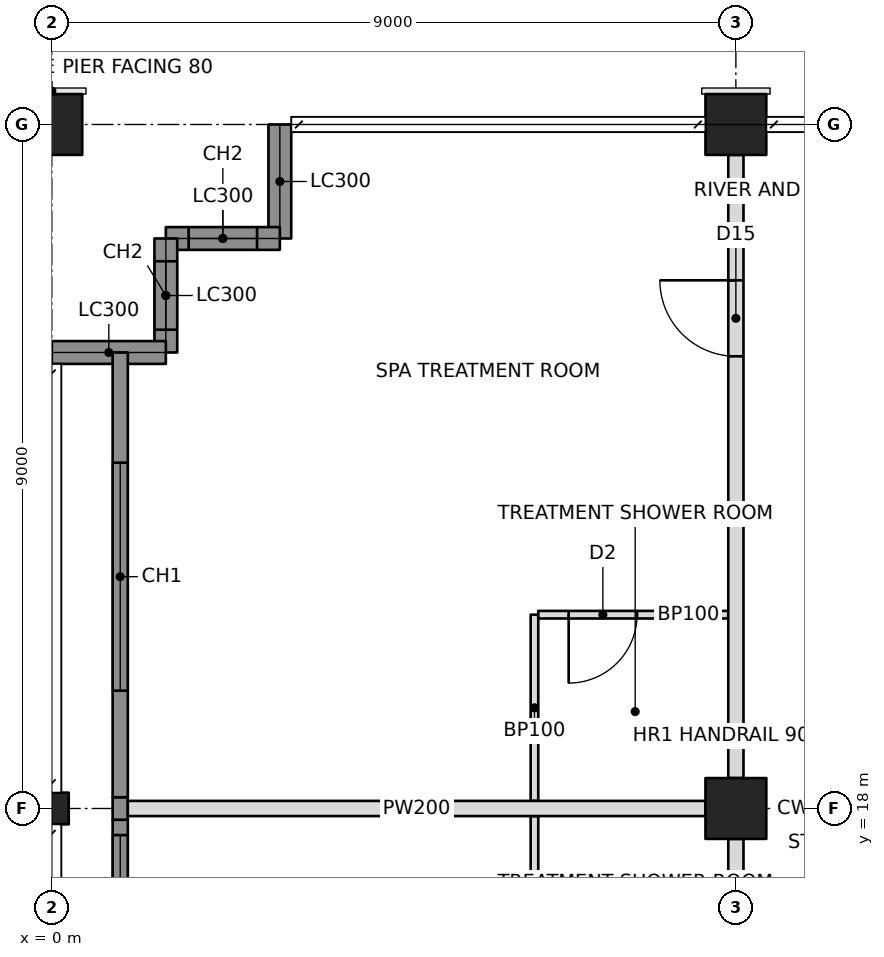
"""IFC4 building model, lengths in metres.
Left out: names, types, materials, properties, quantities, classifications, styles, units other than length and angle.
Written with IfcOpenShell. Run it as: python <this file> out.ifc"""

import sys

from ifc_helpers import new_model, si_unit, direction, frame, frame_2d, origin, origin_2d, place, context, subcontext, project, spatial, rectangle, hollow_rectangle, i_section, extrude, element, fill, save


model = new_model("IFC4")
c1 = context("Model", 3, precision=1e-05, world=origin(), true_north=direction((0.0, 1.0)))
c2 = subcontext(c1, "Body", "Model", "MODEL_VIEW")
j1 = project(units=[si_unit("LENGTHUNIT", "METRE"), si_unit("PLANEANGLEUNIT", "RADIAN")], contexts=[c1])
p1 = place(None, origin())
s1 = spatial("IfcSite", under=j1, at=p1, CompositionType="ELEMENT")
p2 = place(p1, origin())
s2 = spatial("IfcBuilding", under=s1, at=p2, CompositionType="ELEMENT")
p3 = place(p2, frame((0.0, 0.0, 266.2)))
s3 = spatial("IfcBuildingStorey", under=s2, at=p3, CompositionType="ELEMENT", Elevation=266.2)
p4 = place(p3, frame((0.0, 18.0, 0.0), z_axis=(0.0, 0.0, 1.0), x_axis=(0.0, 1.0, 0.0)))
e1 = element("IfcColumn", 1, at=p4, inside=s3, PredefinedType="COLUMN", context=c2, shape_type="SweptSolid", body=[
    extrude(i_section(OverallWidth=0.417, OverallDepth=0.445, WebThickness=0.039, FlangeThickness=0.063, at=origin_2d()), origin(), (0.0, 0.0, 1.0), 3.6),
])
for number, where, z_axis, x_axis in (
    (2, (0.0, 27.0, 0.0), (0.0, 0.0, 1.0), (0.0, 1.0, 0.0)),
    (3, (9.0, 18.0, 0.0), (0.0, 0.0, 1.0), (1.0, 0.0, 0.0)),
    (4, (9.0, 27.0, 0.0), (0.0, 0.0, 1.0), (1.0, 0.0, 0.0)),
):
    element("IfcColumn", number, at=place(p3, frame(where, z_axis=z_axis, x_axis=x_axis)), inside=s3, PredefinedType="COLUMN", context=c2, shape_type="SweptSolid", body=[
        extrude(hollow_rectangle(XDim=0.8, YDim=0.8, WallThickness=0.032, at=origin_2d()), origin(), (0.0, 0.0, 1.0), 3.6),
    ])
p5 = place(p3, frame((3.0, 27.0, 0.0), z_axis=(0.0, 0.0, 1.0), x_axis=(0.0, -1.0, 0.0)))
e5 = element("IfcWall", 5, at=p5, inside=s3, PredefinedType="SOLIDWALL", context=c2, shape_type="SweptSolid", body=[
    extrude(rectangle(XDim=1.5, YDim=0.3, at=frame_2d((0.75, 0.0))), origin(), (0.0, 0.0, 1.0), 2.57),
])
p6 = place(p3, frame((3.0, 25.5, 0.0), z_axis=(0.0, 0.0, 1.0), x_axis=(-1.0, 0.0, 0.0)))
e6 = element("IfcWall", 6, at=p6, inside=s3, PredefinedType="SOLIDWALL", context=c2, shape_type="SweptSolid", body=[
    extrude(rectangle(XDim=1.5, YDim=0.3, at=frame_2d((0.75, 0.0))), origin(), (0.0, 0.0, 1.0), 3.35),
])
p7 = place(p6, frame((0.3, 0.0, 0.6)))
e7 = element("IfcOpeningElement", 7, at=p7, cuts=e6, PredefinedType="OPENING", context=c2, shape_type="SweptSolid", body=[
    extrude(rectangle(XDim=0.9, YDim=2.2, at=frame_2d((0.45, 1.1))), frame((0.0, 0.16, 0.0), z_axis=(0.0, -1.0, 0.0), x_axis=(1.0, 0.0, 0.0)), (0.0, 0.0, 1.0), 0.32),
])
p8 = place(p3, frame((1.5, 25.5, 0.0), z_axis=(0.0, 0.0, 1.0), x_axis=(0.0, -1.0, 0.0)))
e8 = element("IfcWall", 8, at=p8, inside=s3, PredefinedType="SOLIDWALL", context=c2, shape_type="SweptSolid", body=[
    extrude(rectangle(XDim=1.5, YDim=0.3, at=frame_2d((0.75, 0.0))), origin(), (0.0, 0.0, 1.0), 3.35),
])
p9 = place(p8, frame((0.3, 0.0, 0.6)))
e9 = element("IfcOpeningElement", 9, at=p9, cuts=e8, PredefinedType="OPENING", context=c2, shape_type="SweptSolid", body=[
    extrude(rectangle(XDim=0.9, YDim=2.2, at=frame_2d((0.45, 1.1))), frame((0.0, 0.16, 0.0), z_axis=(0.0, -1.0, 0.0), x_axis=(1.0, 0.0, 0.0)), (0.0, 0.0, 1.0), 0.32),
])
p10 = place(p3, frame((1.5, 24.0, 0.0), z_axis=(0.0, 0.0, 1.0), x_axis=(-1.0, 0.0, 0.0)))
e10 = element("IfcWall", 10, at=p10, inside=s3, PredefinedType="SOLIDWALL", context=c2, shape_type="SweptSolid", body=[
    extrude(rectangle(XDim=1.5, YDim=0.3, at=frame_2d((0.75, 0.0))), origin(), (0.0, 0.0, 1.0), 2.57),
])
p11 = place(p3, frame((9.0, 10.8, 0.0), z_axis=(0.0, 0.0, 1.0), x_axis=(0.0, 1.0, 0.0)))
e11 = element("IfcWall", 11, at=p11, inside=s3, PredefinedType="PARTITIONING", context=c2, shape_type="SweptSolid", body=[
    extrude(rectangle(XDim=6.8, YDim=0.2, at=frame_2d((3.4, 0.0))), origin(), (0.0, 0.0, 1.0), 2.491),
])
p12 = place(p11, frame((0.25, 0.0, 0.0)))
e12 = element("IfcOpeningElement", 12, at=p12, cuts=e11, PredefinedType="OPENING", context=c2, shape_type="SweptSolid", body=[
    extrude(rectangle(XDim=1.0, YDim=2.1, at=frame_2d((0.5, 1.05))), frame((0.0, 0.11, 0.0), z_axis=(0.0, -1.0, 0.0), x_axis=(1.0, 0.0, 0.0)), (0.0, 0.0, 1.0), 0.22),
])
p13 = place(p3, frame((9.0, 18.4, 0.0), z_axis=(0.0, 0.0, 1.0), x_axis=(0.0, 1.0, 0.0)))
e13 = element("IfcWall", 13, at=p13, inside=s3, PredefinedType="PARTITIONING", context=c2, shape_type="SweptSolid", body=[
    extrude(rectangle(XDim=8.2, YDim=0.2, at=frame_2d((4.1, 0.0))), origin(), (0.0, 0.0, 1.0), 2.491),
])
p14 = place(p13, frame((5.55, 0.0, 0.0)))
e14 = element("IfcOpeningElement", 14, at=p14, cuts=e13, PredefinedType="OPENING", context=c2, shape_type="SweptSolid", body=[
    extrude(rectangle(XDim=1.0, YDim=2.1, at=frame_2d((0.5, 1.05))), frame((0.0, 0.11, 0.0), z_axis=(0.0, -1.0, 0.0), x_axis=(1.0, 0.0, 0.0)), (0.0, 0.0, 1.0), 0.22),
])
p15 = place(p3, frame((8.6, 18.0, 0.0), z_axis=(0.0, 0.0, 1.0), x_axis=(-1.0, 0.0, 0.0)))
e15 = element("IfcWall", 15, at=p15, inside=s3, PredefinedType="PARTITIONING", context=c2, shape_type="SweptSolid", body=[
    extrude(rectangle(XDim=7.6, YDim=0.2, at=frame_2d((3.8, 0.0))), origin(), (0.0, 0.0, 1.0), 2.491),
])
for number, where, z_axis, x_axis in (
    (16, (6.35, 15.45, 0.0), (0.0, 0.0, 1.0), (0.0, 1.0, 0.0)),
    (17, (6.35, 18.1, 0.0), (0.0, 0.0, 1.0), (0.0, 1.0, 0.0)),
):
    element("IfcWall", number, at=place(p3, frame(where, z_axis=z_axis, x_axis=x_axis)), inside=s3, PredefinedType="PARTITIONING", context=c2, shape_type="SweptSolid", body=[
        extrude(rectangle(XDim=2.45, YDim=0.1, at=frame_2d((1.225, 0.0))), origin(), (0.0, 0.0, 1.0), 2.491),
    ])
p16 = place(p3, frame((8.9, 20.55, 0.0), z_axis=(0.0, 0.0, 1.0), x_axis=(-1.0, 0.0, 0.0)))
e18 = element("IfcWall", 18, at=p16, inside=s3, PredefinedType="PARTITIONING", context=c2, shape_type="SweptSolid", body=[
    extrude(rectangle(XDim=2.5, YDim=0.1, at=frame_2d((1.25, 0.0))), origin(), (0.0, 0.0, 1.0), 2.491),
])
p17 = place(p16, frame((1.2, 0.0, 0.0)))
e19 = element("IfcOpeningElement", 19, at=p17, cuts=e18, PredefinedType="OPENING", context=c2, shape_type="SweptSolid", body=[
    extrude(rectangle(XDim=0.9, YDim=2.1, at=frame_2d((0.45, 1.05))), frame((0.0, 0.06, 0.0), z_axis=(0.0, -1.0, 0.0), x_axis=(1.0, 0.0, 0.0)), (0.0, 0.0, 1.0), 0.12),
])
p18 = place(p3, frame((0.9, 9.148, 0.0), z_axis=(0.0, 0.0, 1.0), x_axis=(0.0, 1.0, 0.0)))
e20 = element("IfcWall", 20, at=p18, inside=s3, PredefinedType="SOLIDWALL", context=c2, shape_type="SweptSolid", body=[
    extrude(rectangle(XDim=8.704, YDim=0.2, at=frame_2d((4.352, 0.0))), origin(), (0.0, 0.0, 1.0), 3.35),
])
p19 = place(p18, frame((2.002, 0.0, 0.6)))
e21 = element("IfcOpeningElement", 21, at=p19, cuts=e20, PredefinedType="OPENING", context=c2, shape_type="SweptSolid", body=[
    extrude(rectangle(XDim=3.0, YDim=2.2, at=frame_2d((1.5, 1.1))), frame((0.0, 0.11, 0.0), z_axis=(0.0, -1.0, 0.0), x_axis=(1.0, 0.0, 0.0)), (0.0, 0.0, 1.0), 0.22),
])
p20 = place(p18, frame((5.502, 0.0, 0.6)))
e22 = element("IfcOpeningElement", 22, at=p20, cuts=e20, PredefinedType="OPENING", context=c2, shape_type="SweptSolid", body=[
    extrude(rectangle(XDim=3.0, YDim=2.2, at=frame_2d((1.5, 1.1))), frame((0.0, 0.11, 0.0), z_axis=(0.0, -1.0, 0.0), x_axis=(1.0, 0.0, 0.0)), (0.0, 0.0, 1.0), 0.22),
])
p21 = place(p3, frame((0.9, 17.852, 0.0), z_axis=(0.0, 0.0, 1.0), x_axis=(0.0, 1.0, 0.0)))
e23 = element("IfcWall", 23, at=p21, inside=s3, PredefinedType="SOLIDWALL", context=c2, shape_type="SweptSolid", body=[
    extrude(rectangle(XDim=0.296, YDim=0.2, at=frame_2d((0.148, 0.0))), origin(), (0.0, 0.0, 1.0), 2.491),
])
p22 = place(p3, frame((0.9, 18.148, 0.0), z_axis=(0.0, 0.0, 1.0), x_axis=(0.0, 1.0, 0.0)))
e24 = element("IfcWall", 24, at=p22, inside=s3, PredefinedType="SOLIDWALL", context=c2, shape_type="SweptSolid", body=[
    extrude(rectangle(XDim=5.852, YDim=0.2, at=frame_2d((2.926, 0.0))), origin(), (0.0, 0.0, 1.0), 3.35),
])
p23 = place(p22, frame((1.402, 0.0, 0.6)))
e25 = element("IfcOpeningElement", 25, at=p23, cuts=e24, PredefinedType="OPENING", context=c2, shape_type="SweptSolid", body=[
    extrude(rectangle(XDim=3.0, YDim=2.2, at=frame_2d((1.5, 1.1))), frame((0.0, 0.11, 0.0), z_axis=(0.0, -1.0, 0.0), x_axis=(1.0, 0.0, 0.0)), (0.0, 0.0, 1.0), 0.22),
])
p24 = place(p7, origin())
e26 = element("IfcWindow", 26, at=p24, inside=s3, PartitioningType="SINGLE_PANEL", PredefinedType="WINDOW", context=c2, shape_type="SweptSolid", body=[
    extrude(rectangle(XDim=0.9, YDim=2.2, at=frame_2d((0.45, 1.1))), frame((0.0, 0.03, 0.0), z_axis=(0.0, -1.0, 0.0), x_axis=(1.0, 0.0, 0.0)), (0.0, 0.0, 1.0), 0.06),
])
fill(e7, e26)
p25 = place(p9, origin())
e27 = element("IfcWindow", 27, at=p25, inside=s3, PartitioningType="SINGLE_PANEL", PredefinedType="WINDOW", context=c2, shape_type="SweptSolid", body=[
    extrude(rectangle(XDim=0.9, YDim=2.2, at=frame_2d((0.45, 1.1))), frame((0.0, 0.03, 0.0), z_axis=(0.0, -1.0, 0.0), x_axis=(1.0, 0.0, 0.0)), (0.0, 0.0, 1.0), 0.06),
])
fill(e9, e27)
p26 = place(p20, origin())
e28 = element("IfcWindow", 28, at=p26, inside=s3, PartitioningType="TRIPLE_PANEL_VERTICAL", PredefinedType="WINDOW", context=c2, shape_type="SweptSolid", body=[
    extrude(rectangle(XDim=3.0, YDim=2.2, at=frame_2d((1.5, 1.1))), frame((0.0, 0.03, 0.0), z_axis=(0.0, -1.0, 0.0), x_axis=(1.0, 0.0, 0.0)), (0.0, 0.0, 1.0), 0.06),
])
fill(e22, e28)
p27 = place(p23, origin())
e29 = element("IfcWindow", 29, at=p27, inside=s3, PartitioningType="TRIPLE_PANEL_VERTICAL", PredefinedType="WINDOW", context=c2, shape_type="SweptSolid", body=[
    extrude(rectangle(XDim=3.0, YDim=2.2, at=frame_2d((1.5, 1.1))), frame((0.0, 0.03, 0.0), z_axis=(0.0, -1.0, 0.0), x_axis=(1.0, 0.0, 0.0)), (0.0, 0.0, 1.0), 0.06),
])
fill(e25, e29)
p28 = place(p17, origin())
e30 = element("IfcDoor", 30, at=p28, inside=s3, OperationType="SINGLE_SWING_RIGHT", PredefinedType="DOOR", context=c2, shape_type="SweptSolid", body=[
    extrude(rectangle(XDim=0.9, YDim=2.1, at=frame_2d((0.45, 1.05))), frame((0.0, 0.025, 0.0), z_axis=(0.0, -1.0, 0.0), x_axis=(1.0, 0.0, 0.0)), (0.0, 0.0, 1.0), 0.05),
])
fill(e19, e30)
p29 = place(p14, origin())
e31 = element("IfcDoor", 31, at=p29, inside=s3, OperationType="SINGLE_SWING_RIGHT", PredefinedType="DOOR", context=c2, shape_type="SweptSolid", body=[
    extrude(rectangle(XDim=1.0, YDim=2.1, at=frame_2d((0.5, 1.05))), frame((0.0, 0.025, 0.0), z_axis=(0.0, -1.0, 0.0), x_axis=(1.0, 0.0, 0.0)), (0.0, 0.0, 1.0), 0.05),
])
fill(e14, e31)
save(model, sys.argv[1])
